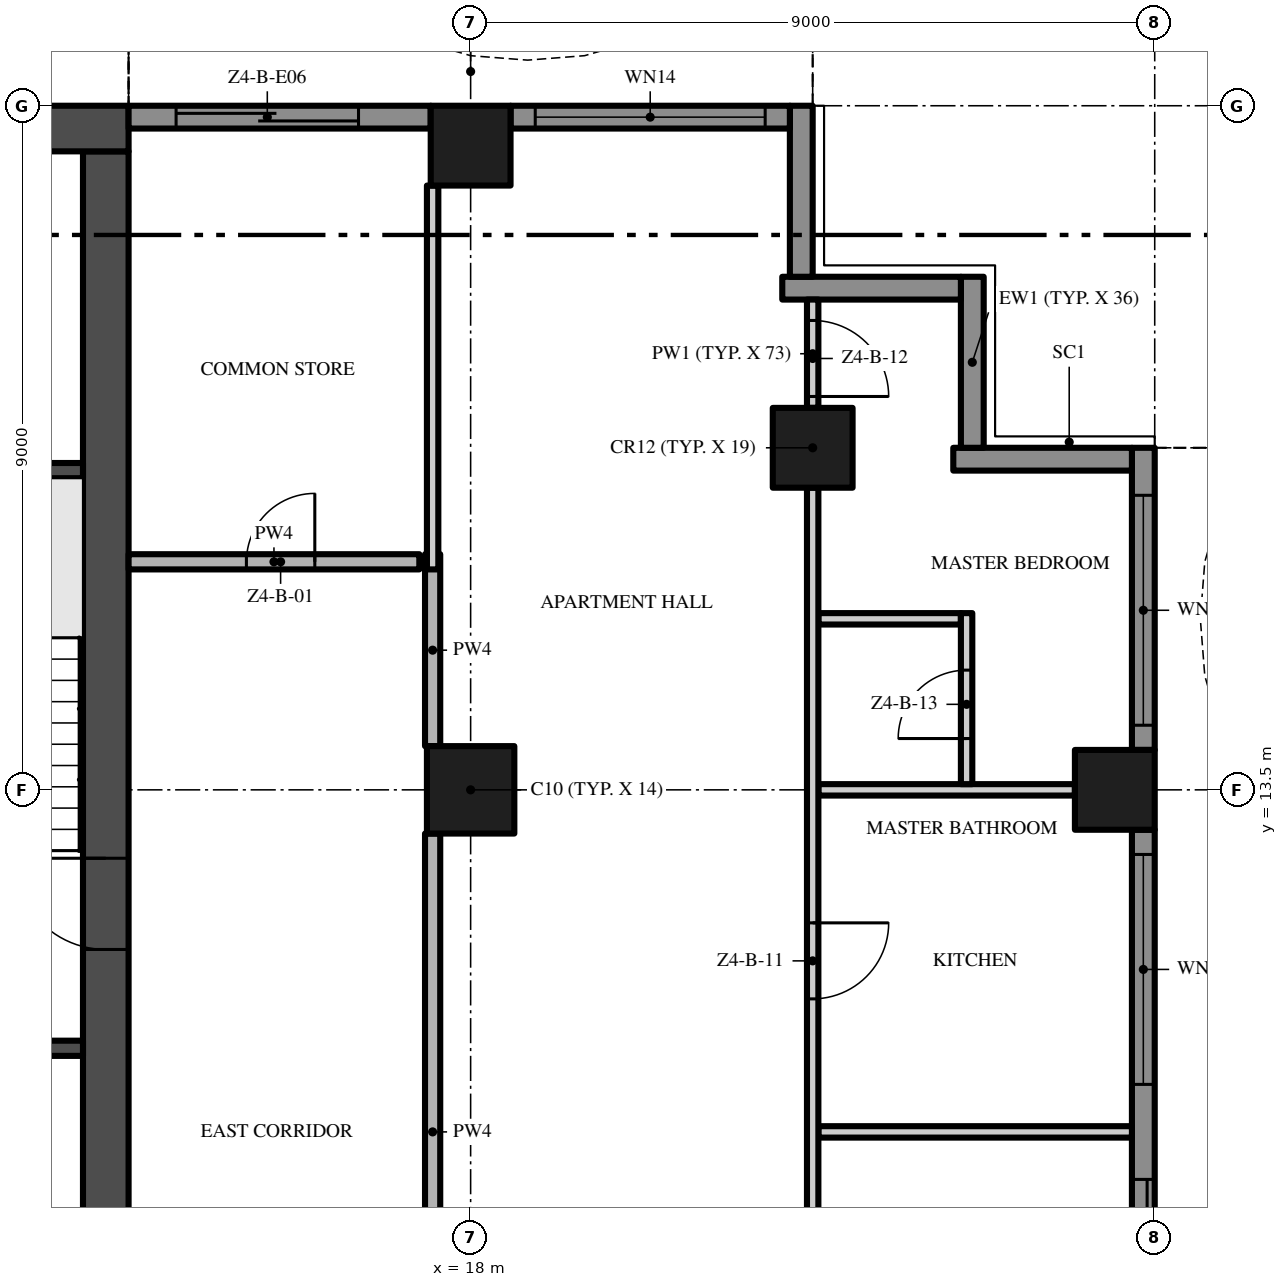
"""IFC4 building model, lengths in metres.
Left out: names, types, materials, properties, quantities, classifications, styles, units other than length and angle.
Written with IfcOpenShell. Run it as: python <this file> out.ifc"""

import sys

from ifc_helpers import new_model, si_unit, direction, frame, frame_2d, origin, origin_2d, place, context, subcontext, project, spatial, polyline, rectangle, outline, extrude, element, fill, save


model = new_model("IFC4")
c1 = context("Model", 3, precision=1e-05, world=origin(), true_north=direction((0.0, 1.0)))
c2 = subcontext(c1, "Body", "Model", "MODEL_VIEW")
j1 = project(units=[si_unit("LENGTHUNIT", "METRE"), si_unit("PLANEANGLEUNIT", "RADIAN")], contexts=[c1])
p1 = place(None, origin())
s1 = spatial("IfcSite", under=j1, at=p1, CompositionType="ELEMENT")
p2 = place(p1, origin())
s2 = spatial("IfcBuilding", under=s1, at=p2, CompositionType="ELEMENT")
p3 = place(p2, frame((0.0, 0.0, 195.8)))
s3 = spatial("IfcBuildingStorey", under=s2, at=p3, CompositionType="ELEMENT", Elevation=195.8)
p4 = place(p3, frame((13.2, 5.1, -0.3), z_axis=(0.0, 0.0, 1.0), x_axis=(0.0, 1.0, 0.0)))
e1 = element("IfcWall", 1, at=p4, inside=s3, PredefinedType="SHEAR", context=c2, shape_type="SweptSolid", body=[
    extrude(rectangle(XDim=16.8, YDim=0.6, at=frame_2d((8.4, 0.0))), origin(), (0.0, 0.0, 1.0), 3.8),
])
p5 = place(p4, frame((6.3, 0.0, 0.3)))
e2 = element("IfcOpeningElement", 2, at=p5, cuts=e1, PredefinedType="OPENING", context=c2, shape_type="SweptSolid", body=[
    extrude(rectangle(XDim=1.2, YDim=2.2, at=frame_2d((0.6, 1.1))), frame((0.0, 0.31, 0.0), z_axis=(0.0, -1.0, 0.0), x_axis=(1.0, 0.0, 0.0)), (0.0, 0.0, 1.0), 0.62),
])
p6 = place(p3, frame((13.5, 22.2, -0.3), z_axis=(0.0, 0.0, 1.0), x_axis=(-1.0, 0.0, 0.0)))
e3 = element("IfcWall", 3, at=p6, inside=s3, PredefinedType="SHEAR", context=c2, shape_type="SweptSolid", body=[
    extrude(rectangle(XDim=27.0, YDim=0.6, at=frame_2d((13.5, 0.0))), origin(), (0.0, 0.0, 1.0), 3.8),
])
p7 = place(p3, frame((18.0, 13.5, 0.0), z_axis=(0.0, 0.0, 1.0), x_axis=(1.0, 0.0, 0.0)))
e4 = element("IfcColumn", 4, at=p7, inside=s3, PredefinedType="COLUMN", context=c2, shape_type="SweptSolid", body=[
    extrude(rectangle(XDim=1.15, YDim=1.15, at=origin_2d()), origin(), (0.0, 0.0, 1.0), 3.5),
])
for number, where, z_axis, x_axis in (
    (5, (18.0, 21.975, 0.0), (0.0, 0.0, 1.0), (1.0, 0.0, 0.0)),
    (6, (26.475, 13.5, 0.0), (0.0, 0.0, 1.0), (1.0, 0.0, 0.0)),
    (7, (22.5, 18.0, 0.0), (0.0, 0.0, 1.0), (1.0, 0.0, 0.0)),
):
    element("IfcColumn", number, at=place(p3, frame(where, z_axis=z_axis, x_axis=x_axis)), inside=s3, PredefinedType="COLUMN", context=c2, shape_type="SweptSolid", body=[
        extrude(rectangle(XDim=1.05, YDim=1.05, at=origin_2d()), origin(), (0.0, 0.0, 1.0), 3.5),
    ])
p8 = place(p3, frame((26.85, 12.975, 0.0), z_axis=(0.0, 0.0, 1.0), x_axis=(0.0, -1.0, 0.0)))
e8 = element("IfcWall", 8, at=p8, inside=s3, PredefinedType="SOLIDWALL", context=c2, shape_type="SweptSolid", body=[
    extrude(rectangle(XDim=7.95, YDim=0.3, at=frame_2d((3.975, 0.0))), origin(), (0.0, 0.0, 1.0), 3.5),
])
p9 = place(p8, frame((4.6, 0.0, 0.0)))
e9 = element("IfcOpeningElement", 9, at=p9, cuts=e8, PredefinedType="OPENING", context=c2, shape_type="SweptSolid", body=[
    extrude(rectangle(XDim=3.025, YDim=2.4, at=frame_2d((1.512, 1.2))), frame((0.0, 0.16, 0.0), z_axis=(0.0, -1.0, 0.0), x_axis=(1.0, 0.0, 0.0)), (0.0, 0.0, 1.0), 0.32),
])
p10 = place(p8, frame((0.325, 0.0, 0.45)))
e10 = element("IfcOpeningElement", 10, at=p10, cuts=e8, PredefinedType="OPENING", context=c2, shape_type="SweptSolid", body=[
    extrude(rectangle(XDim=3.025, YDim=2.65, at=frame_2d((1.512, 1.325))), frame((0.0, 0.16, 0.0), z_axis=(0.0, -1.0, 0.0), x_axis=(1.0, 0.0, 0.0)), (0.0, 0.0, 1.0), 0.32),
])
p11 = place(p3, frame((26.85, 18.0, 0.0), z_axis=(0.0, 0.0, 1.0), x_axis=(0.0, -1.0, 0.0)))
e11 = element("IfcWall", 11, at=p11, inside=s3, PredefinedType="SOLIDWALL", context=c2, shape_type="SweptSolid", body=[
    extrude(rectangle(XDim=3.975, YDim=0.3, at=frame_2d((1.988, 0.0))), origin(), (0.0, 0.0, 1.0), 3.5),
])
p12 = place(p11, frame((0.625, 0.0, 0.45)))
e12 = element("IfcOpeningElement", 12, at=p12, cuts=e11, PredefinedType="OPENING", context=c2, shape_type="SweptSolid", body=[
    extrude(rectangle(XDim=3.025, YDim=2.65, at=frame_2d((1.512, 1.325))), frame((0.0, 0.16, 0.0), z_axis=(0.0, -1.0, 0.0), x_axis=(1.0, 0.0, 0.0)), (0.0, 0.0, 1.0), 0.32),
])
p13 = place(p3, frame((24.35, 17.85, 0.0), z_axis=(0.0, 0.0, 1.0), x_axis=(1.0, 0.0, 0.0)))
e13 = element("IfcWall", 13, at=p13, inside=s3, PredefinedType="SOLIDWALL", context=c2, shape_type="SweptSolid", body=[
    extrude(rectangle(XDim=2.35, YDim=0.3, at=frame_2d((1.175, 0.0))), origin(), (0.0, 0.0, 1.0), 3.5),
])
p14 = place(p3, frame((24.6, 20.25, 0.0), z_axis=(0.0, 0.0, 1.0), x_axis=(0.0, -1.0, 0.0)))
e14 = element("IfcWall", 14, at=p14, inside=s3, PredefinedType="SOLIDWALL", context=c2, shape_type="SweptSolid", body=[
    extrude(rectangle(XDim=2.25, YDim=0.3, at=frame_2d((1.125, 0.0))), origin(), (0.0, 0.0, 1.0), 3.5),
])
p15 = place(p3, frame((22.1, 20.1, 0.0), z_axis=(0.0, 0.0, 1.0), x_axis=(1.0, 0.0, 0.0)))
e15 = element("IfcWall", 15, at=p15, inside=s3, PredefinedType="SOLIDWALL", context=c2, shape_type="SweptSolid", body=[
    extrude(rectangle(XDim=2.35, YDim=0.3, at=frame_2d((1.175, 0.0))), origin(), (0.0, 0.0, 1.0), 3.5),
])
p16 = place(p3, frame((22.35, 22.5, 0.0), z_axis=(0.0, 0.0, 1.0), x_axis=(0.0, -1.0, 0.0)))
e16 = element("IfcWall", 16, at=p16, inside=s3, PredefinedType="SOLIDWALL", context=c2, shape_type="SweptSolid", body=[
    extrude(rectangle(XDim=2.25, YDim=0.3, at=frame_2d((1.125, 0.0))), origin(), (0.0, 0.0, 1.0), 3.5),
])
p17 = place(p3, frame((18.525, 22.35, 0.0), z_axis=(0.0, 0.0, 1.0), x_axis=(1.0, 0.0, 0.0)))
e17 = element("IfcWall", 17, at=p17, inside=s3, PredefinedType="SOLIDWALL", context=c2, shape_type="SweptSolid", body=[
    extrude(rectangle(XDim=3.675, YDim=0.3, at=frame_2d((1.837, 0.0))), origin(), (0.0, 0.0, 1.0), 3.5),
])
p18 = place(p17, frame((0.325, 0.0, 0.45)))
e18 = element("IfcOpeningElement", 18, at=p18, cuts=e17, PredefinedType="OPENING", context=c2, shape_type="SweptSolid", body=[
    extrude(rectangle(XDim=3.025, YDim=2.65, at=frame_2d((1.512, 1.325))), frame((0.0, 0.16, 0.0), z_axis=(0.0, -1.0, 0.0), x_axis=(1.0, 0.0, 0.0)), (0.0, 0.0, 1.0), 0.32),
])
p19 = place(p3, frame((13.5, 22.35, 0.0), z_axis=(0.0, 0.0, 1.0), x_axis=(1.0, 0.0, 0.0)))
e19 = element("IfcWall", 19, at=p19, inside=s3, PredefinedType="SOLIDWALL", context=c2, shape_type="SweptSolid", body=[
    extrude(rectangle(XDim=3.975, YDim=0.3, at=frame_2d((1.988, 0.0))), origin(), (0.0, 0.0, 1.0), 3.5),
])
p20 = place(p19, frame((0.625, 0.0, 0.0)))
e20 = element("IfcOpeningElement", 20, at=p20, cuts=e19, PredefinedType="OPENING", context=c2, shape_type="SweptSolid", body=[
    extrude(rectangle(XDim=2.4, YDim=2.4, at=frame_2d((1.2, 1.2))), frame((0.0, 0.16, 0.0), z_axis=(0.0, -1.0, 0.0), x_axis=(1.0, 0.0, 0.0)), (0.0, 0.0, 1.0), 0.32),
])
p21 = place(p3, origin())
e21 = element("IfcWall", 21, at=p21, inside=s3, PredefinedType="USERDEFINED", context=c2, shape_type="SweptSolid", body=[
    extrude(outline(polyline([(28.8, -18.0), (28.095, -16.5), (27.659, -15.0), (27.6, -14.25), (27.659, -13.5), (28.095, -12.0), (28.8, -10.5), (29.505, -9.0), (29.941, -7.5), (30.0, -6.75), (29.941, -6.0), (29.505, -4.5), (28.8, -3.0), (28.095, -1.5), (27.659, 0.0), (27.6, 0.75), (27.659, 1.5), (28.095, 3.0), (28.8, 4.5), (29.505, 6.0), (29.941, 7.5), (30.0, 8.25), (29.941, 9.0), (29.505, 10.5), (28.8, 12.0), (28.095, 13.5), (27.659, 15.0), (27.6, 15.75), (27.659, 16.5), (28.095, 18.0), (27.855, 18.07), (27.411, 16.545), (27.349, 15.75), (27.411, 14.955), (27.86, 13.411), (28.574, 11.894), (29.271, 10.411), (29.694, 8.955), (29.749, 8.25), (29.694, 7.545), (29.271, 6.089), (28.574, 4.606), (27.86, 3.089), (27.411, 1.545), (27.349, 0.75), (27.411, -0.045), (27.86, -1.589), (28.574, -3.106), (29.271, -4.589), (29.694, -6.045), (29.749, -6.75), (29.694, -7.455), (29.271, -8.911), (28.574, -10.394), (27.86, -11.911), (27.411, -13.455), (27.349, -14.25), (27.411, -15.045), (27.86, -16.589), (28.574, -18.106), (28.8, -18.0)])), origin(), (0.0, 0.0, 1.0), 0.9),
])
p22 = place(p3, origin())
e22 = element("IfcWall", 22, at=p22, inside=s3, PredefinedType="USERDEFINED", context=c2, shape_type="SweptSolid", body=[
    extrude(outline(polyline([(22.5, 24.3), (21.0, 23.595), (19.5, 23.159), (18.75, 23.1), (18.0, 23.159), (16.5, 23.595), (15.0, 24.3), (13.5, 25.005), (13.394, 24.779), (14.894, 24.074), (16.411, 23.36), (17.955, 22.911), (18.75, 22.849), (19.545, 22.911), (21.089, 23.36), (22.606, 24.074), (22.5, 24.3)])), origin(), (0.0, 0.0, 1.0), 0.9),
])
for number, where, z_axis, x_axis in (
    (23, (9.65, 10.1, 0.0), (0.0, 0.0, 1.0), (1.0, 0.0, 0.0)),
    (24, (9.65, 17.7, 0.0), (0.0, 0.0, 1.0), (1.0, 0.0, 0.0)),
):
    element("IfcWall", number, at=place(p3, frame(where, z_axis=z_axis, x_axis=x_axis)), inside=s3, PredefinedType="SHEAR", context=c2, shape_type="SweptSolid", body=[
        extrude(rectangle(XDim=3.25, YDim=0.2, at=frame_2d((1.625, 0.0))), origin(), (0.0, 0.0, 1.0), 3.5),
    ])
p23 = place(p3, frame((22.575, 9.0, 0.0), z_axis=(0.0, 0.0, 1.0), x_axis=(1.0, 0.0, 0.0)))
e25 = element("IfcWall", 25, at=p23, inside=s3, PredefinedType="PARTITIONING", context=c2, shape_type="SweptSolid", body=[
    extrude(rectangle(XDim=4.125, YDim=0.15, at=frame_2d((2.062, 0.0))), origin(), (0.0, 0.0, 1.0), 3.5),
])
p24 = place(p3, frame((22.575, 13.5, 0.0), z_axis=(0.0, 0.0, 1.0), x_axis=(1.0, 0.0, 0.0)))
e26 = element("IfcWall", 26, at=p24, inside=s3, PredefinedType="PARTITIONING", context=c2, shape_type="SweptSolid", body=[
    extrude(rectangle(XDim=3.375, YDim=0.15, at=frame_2d((1.688, 0.0))), origin(), (0.0, 0.0, 1.0), 3.5),
])
p25 = place(p3, frame((22.575, 15.75, 0.0), z_axis=(0.0, 0.0, 1.0), x_axis=(1.0, 0.0, 0.0)))
e27 = element("IfcWall", 27, at=p25, inside=s3, PredefinedType="PARTITIONING", context=c2, shape_type="SweptSolid", body=[
    extrude(rectangle(XDim=1.875, YDim=0.15, at=frame_2d((0.938, 0.0))), origin(), (0.0, 0.0, 1.0), 3.5),
])
p26 = place(p3, frame((13.5, 16.5, 0.0), z_axis=(0.0, 0.0, 1.0), x_axis=(1.0, 0.0, 0.0)))
e28 = element("IfcWall", 28, at=p26, inside=s3, PredefinedType="PARTITIONING", context=c2, shape_type="SweptSolid", body=[
    extrude(rectangle(XDim=3.825, YDim=0.2, at=frame_2d((1.913, 0.0))), origin(), (0.0, 0.0, 1.0), 3.5),
])
p27 = place(p26, frame((1.55, 0.0, 0.0)))
e29 = element("IfcOpeningElement", 29, at=p27, cuts=e28, PredefinedType="OPENING", context=c2, shape_type="SweptSolid", body=[
    extrude(rectangle(XDim=0.9, YDim=2.1, at=frame_2d((0.45, 1.05))), frame((0.0, 0.11, 0.0), z_axis=(0.0, -1.0, 0.0), x_axis=(1.0, 0.0, 0.0)), (0.0, 0.0, 1.0), 0.22),
])
p28 = place(p3, frame((17.5, 12.925, 0.0), z_axis=(0.0, 0.0, 1.0), x_axis=(0.0, -1.0, 0.0)))
e30 = element("IfcWall", 30, at=p28, inside=s3, PredefinedType="PARTITIONING", context=c2, shape_type="SweptSolid", body=[
    extrude(rectangle(XDim=7.85, YDim=0.2, at=frame_2d((3.925, 0.0))), origin(), (0.0, 0.0, 1.0), 3.5),
])
p29 = place(p28, frame((5.6, 0.0, 0.0)))
e31 = element("IfcOpeningElement", 31, at=p29, cuts=e30, PredefinedType="OPENING", context=c2, shape_type="SweptSolid", body=[
    extrude(rectangle(XDim=1.2, YDim=2.4, at=frame_2d((0.6, 1.2))), frame((0.0, 0.11, 0.0), z_axis=(0.0, -1.0, 0.0), x_axis=(1.0, 0.0, 0.0)), (0.0, 0.0, 1.0), 0.22),
])
p30 = place(p3, frame((17.5, 14.075, 0.0), z_axis=(0.0, 0.0, 1.0), x_axis=(0.0, 1.0, 0.0)))
e32 = element("IfcWall", 32, at=p30, inside=s3, PredefinedType="PARTITIONING", context=c2, shape_type="SweptSolid", body=[
    extrude(rectangle(XDim=2.525, YDim=0.2, at=frame_2d((1.262, 0.0))), origin(), (0.0, 0.0, 1.0), 3.5),
])
p31 = place(p3, frame((17.5, 16.4, 0.0), z_axis=(0.0, 0.0, 1.0), x_axis=(0.0, 1.0, 0.0)))
e33 = element("IfcWall", 33, at=p31, inside=s3, PredefinedType="PARTITIONING", context=c2, shape_type="SweptSolid", body=[
    extrude(rectangle(XDim=5.05, YDim=0.15, at=frame_2d((2.525, 0.0))), origin(), (0.0, 0.0, 1.0), 3.5),
])
p32 = place(p3, frame((22.5, 17.475, 0.0), z_axis=(0.0, 0.0, 1.0), x_axis=(0.0, -1.0, 0.0)))
e34 = element("IfcWall", 34, at=p32, inside=s3, PredefinedType="PARTITIONING", context=c2, shape_type="SweptSolid", body=[
    extrude(rectangle(XDim=17.375, YDim=0.15, at=frame_2d((8.688, 0.0))), origin(), (0.0, 0.0, 1.0), 3.5),
])
p33 = place(p32, frame((13.175, 0.0, 0.0)))
e35 = element("IfcOpeningElement", 35, at=p33, cuts=e34, PredefinedType="OPENING", context=c2, shape_type="SweptSolid", body=[
    extrude(rectangle(XDim=1.8, YDim=2.4, at=frame_2d((0.9, 1.2))), frame((0.0, 0.085, 0.0), z_axis=(0.0, -1.0, 0.0), x_axis=(1.0, 0.0, 0.0)), (0.0, 0.0, 1.0), 0.17),
])
p34 = place(p32, frame((5.725, 0.0, 0.0)))
e36 = element("IfcOpeningElement", 36, at=p34, cuts=e34, PredefinedType="OPENING", context=c2, shape_type="SweptSolid", body=[
    extrude(rectangle(XDim=1.0, YDim=2.4, at=frame_2d((0.5, 1.2))), frame((0.0, 0.085, 0.0), z_axis=(0.0, -1.0, 0.0), x_axis=(1.0, 0.0, 0.0)), (0.0, 0.0, 1.0), 0.17),
])
p35 = place(p3, frame((22.5, 19.95, 0.0), z_axis=(0.0, 0.0, 1.0), x_axis=(0.0, -1.0, 0.0)))
e37 = element("IfcWall", 37, at=p35, inside=s3, PredefinedType="PARTITIONING", context=c2, shape_type="SweptSolid", body=[
    extrude(rectangle(XDim=1.425, YDim=0.15, at=frame_2d((0.713, 0.0))), origin(), (0.0, 0.0, 1.0), 3.5),
])
p36 = place(p35, frame((0.275, 0.0, 0.0)))
e38 = element("IfcOpeningElement", 38, at=p36, cuts=e37, PredefinedType="OPENING", context=c2, shape_type="SweptSolid", body=[
    extrude(rectangle(XDim=1.0, YDim=2.4, at=frame_2d((0.5, 1.2))), frame((0.0, 0.085, 0.0), z_axis=(0.0, -1.0, 0.0), x_axis=(1.0, 0.0, 0.0)), (0.0, 0.0, 1.0), 0.17),
])
p37 = place(p3, frame((24.525, 13.575, 0.0), z_axis=(0.0, 0.0, 1.0), x_axis=(0.0, 1.0, 0.0)))
e39 = element("IfcWall", 39, at=p37, inside=s3, PredefinedType="PARTITIONING", context=c2, shape_type="SweptSolid", body=[
    extrude(rectangle(XDim=2.25, YDim=0.15, at=frame_2d((1.125, 0.0))), origin(), (0.0, 0.0, 1.0), 3.5),
])
p38 = place(p37, frame((0.6, 0.0, 0.0)))
e40 = element("IfcOpeningElement", 40, at=p38, cuts=e39, PredefinedType="OPENING", context=c2, shape_type="SweptSolid", body=[
    extrude(rectangle(XDim=0.9, YDim=2.1, at=frame_2d((0.45, 1.05))), frame((0.0, 0.085, 0.0), z_axis=(0.0, -1.0, 0.0), x_axis=(1.0, 0.0, 0.0)), (0.0, 0.0, 1.0), 0.17),
])
p39 = place(p9, origin())
e41 = element("IfcDoor", 41, at=p39, inside=s3, OperationType="SINGLE_SWING_LEFT", PredefinedType="DOOR", context=c2, shape_type="SweptSolid", body=[
    extrude(rectangle(XDim=3.025, YDim=2.4, at=frame_2d((1.512, 1.2))), frame((0.0, 0.025, 0.0), z_axis=(0.0, -1.0, 0.0), x_axis=(1.0, 0.0, 0.0)), (0.0, 0.0, 1.0), 0.05),
])
fill(e9, e41)
p40 = place(p10, origin())
e42 = element("IfcWindow", 42, at=p40, inside=s3, PartitioningType="SINGLE_PANEL", PredefinedType="WINDOW", context=c2, shape_type="SweptSolid", body=[
    extrude(rectangle(XDim=3.025, YDim=2.65, at=frame_2d((1.512, 1.325))), frame((0.0, 0.03, 0.0), z_axis=(0.0, -1.0, 0.0), x_axis=(1.0, 0.0, 0.0)), (0.0, 0.0, 1.0), 0.06),
])
fill(e10, e42)
p41 = place(p12, origin())
e43 = element("IfcWindow", 43, at=p41, inside=s3, PartitioningType="SINGLE_PANEL", PredefinedType="WINDOW", context=c2, shape_type="SweptSolid", body=[
    extrude(rectangle(XDim=3.025, YDim=2.65, at=frame_2d((1.512, 1.325))), frame((0.0, 0.03, 0.0), z_axis=(0.0, -1.0, 0.0), x_axis=(1.0, 0.0, 0.0)), (0.0, 0.0, 1.0), 0.06),
])
fill(e12, e43)
p42 = place(p18, origin())
e44 = element("IfcWindow", 44, at=p42, inside=s3, PartitioningType="SINGLE_PANEL", PredefinedType="WINDOW", context=c2, shape_type="SweptSolid", body=[
    extrude(rectangle(XDim=3.025, YDim=2.65, at=frame_2d((1.512, 1.325))), frame((0.0, 0.03, 0.0), z_axis=(0.0, -1.0, 0.0), x_axis=(1.0, 0.0, 0.0)), (0.0, 0.0, 1.0), 0.06),
])
fill(e18, e44)
p43 = place(p20, origin())
e45 = element("IfcDoor", 45, at=p43, inside=s3, OperationType="SINGLE_SWING_LEFT", PredefinedType="DOOR", context=c2, shape_type="SweptSolid", body=[
    extrude(rectangle(XDim=2.4, YDim=2.4, at=frame_2d((1.2, 1.2))), frame((0.0, 0.025, 0.0), z_axis=(0.0, -1.0, 0.0), x_axis=(1.0, 0.0, 0.0)), (0.0, 0.0, 1.0), 0.05),
])
fill(e20, e45)
p44 = place(p5, frame((1.2, 0.0, 0.0), z_axis=(0.0, 0.0, 1.0), x_axis=(-1.0, 0.0, 0.0)))
e46 = element("IfcDoor", 46, at=p44, inside=s3, OperationType="SINGLE_SWING_LEFT", PredefinedType="DOOR", context=c2, shape_type="SweptSolid", body=[
    extrude(rectangle(XDim=1.2, YDim=2.2, at=frame_2d((0.6, 1.1))), frame((0.0, 0.025, 0.0), z_axis=(0.0, -1.0, 0.0), x_axis=(1.0, 0.0, 0.0)), (0.0, 0.0, 1.0), 0.05),
])
fill(e2, e46)
p45 = place(p27, origin())
e47 = element("IfcDoor", 47, at=p45, inside=s3, OperationType="SINGLE_SWING_RIGHT", PredefinedType="DOOR", context=c2, shape_type="SweptSolid", body=[
    extrude(rectangle(XDim=0.9, YDim=2.1, at=frame_2d((0.45, 1.05))), frame((0.0, 0.025, 0.0), z_axis=(0.0, -1.0, 0.0), x_axis=(1.0, 0.0, 0.0)), (0.0, 0.0, 1.0), 0.05),
])
fill(e29, e47)
p46 = place(p34, origin())
e48 = element("IfcDoor", 48, at=p46, inside=s3, OperationType="SINGLE_SWING_LEFT", PredefinedType="DOOR", context=c2, shape_type="SweptSolid", body=[
    extrude(rectangle(XDim=1.0, YDim=2.4, at=frame_2d((0.5, 1.2))), frame((0.0, 0.025, 0.0), z_axis=(0.0, -1.0, 0.0), x_axis=(1.0, 0.0, 0.0)), (0.0, 0.0, 1.0), 0.05),
])
fill(e36, e48)
p47 = place(p36, origin())
e49 = element("IfcDoor", 49, at=p47, inside=s3, OperationType="SINGLE_SWING_RIGHT", PredefinedType="DOOR", context=c2, shape_type="SweptSolid", body=[
    extrude(rectangle(XDim=1.0, YDim=2.4, at=frame_2d((0.5, 1.2))), frame((0.0, 0.025, 0.0), z_axis=(0.0, -1.0, 0.0), x_axis=(1.0, 0.0, 0.0)), (0.0, 0.0, 1.0), 0.05),
])
fill(e38, e49)
p48 = place(p38, origin())
e50 = element("IfcDoor", 50, at=p48, inside=s3, OperationType="SINGLE_SWING_LEFT", PredefinedType="DOOR", context=c2, shape_type="SweptSolid", body=[
    extrude(rectangle(XDim=0.9, YDim=2.1, at=frame_2d((0.45, 1.05))), frame((0.0, 0.025, 0.0), z_axis=(0.0, -1.0, 0.0), x_axis=(1.0, 0.0, 0.0)), (0.0, 0.0, 1.0), 0.05),
])
fill(e40, e50)
save(model, sys.argv[1])
